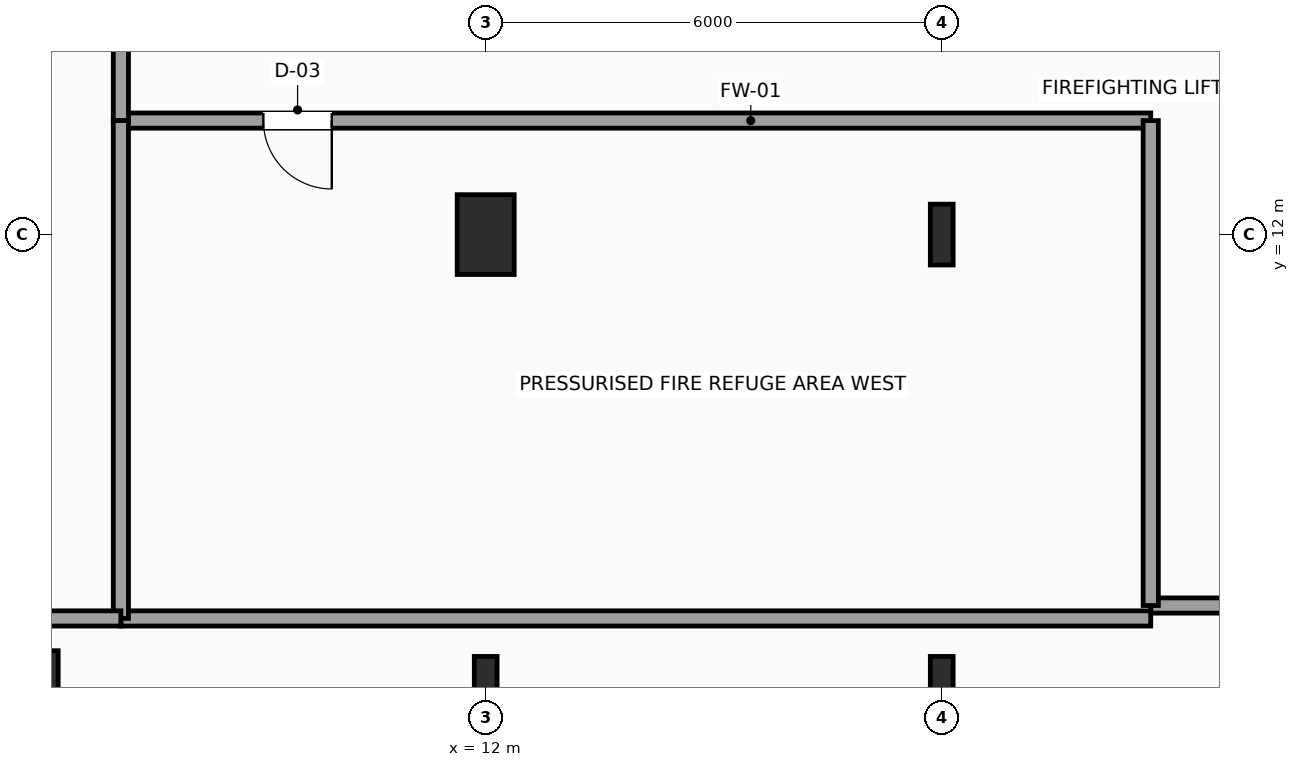
"""IFC4 building model, lengths in metres.
Left out: names, types, materials, properties, quantities, classifications, styles, units other than length and angle.
Written with IfcOpenShell. Run it as: python <this file> out.ifc"""

import sys

from ifc_helpers import new_model, si_unit, direction, frame, frame_2d, origin, origin_2d, place, context, subcontext, project, spatial, rectangle, i_section, extrude, element, fill, save


model = new_model("IFC4")
c1 = context("Model", 3, precision=1e-05, world=origin(), true_north=direction((0.0, 1.0)))
c2 = subcontext(c1, "Body", "Model", "MODEL_VIEW")
j1 = project(units=[si_unit("LENGTHUNIT", "METRE"), si_unit("PLANEANGLEUNIT", "RADIAN")], contexts=[c1])
p1 = place(None, origin())
s1 = spatial("IfcSite", under=j1, at=p1, CompositionType="ELEMENT")
p2 = place(p1, origin())
s2 = spatial("IfcBuilding", under=s1, at=p2, CompositionType="ELEMENT")
p3 = place(p2, frame((0.0, 0.0, 234.9)))
s3 = spatial("IfcBuildingStorey", under=s2, at=p3, CompositionType="ELEMENT", Elevation=234.9)
p4 = place(p3, frame((6.0, 6.0, 0.0), z_axis=(0.0, 0.0, 1.0), x_axis=(1.0, 0.0, 0.0)))
e1 = element("IfcColumn", 1, at=p4, inside=s3, PredefinedType="COLUMN", context=c2, shape_type="SweptSolid", body=[
    extrude(rectangle(XDim=0.75, YDim=1.05, at=origin_2d()), origin(), (0.0, 0.0, 1.0), 4.8),
])
p5 = place(p3, frame((12.0, 6.0, 0.0), z_axis=(0.0, 0.0, 1.0), x_axis=(1.0, 0.0, 0.0)))
e2 = element("IfcColumn", 2, at=p5, inside=s3, PredefinedType="COLUMN", context=c2, shape_type="SweptSolid", body=[
    extrude(i_section(OverallWidth=0.3, OverallDepth=0.9, WebThickness=0.019, FlangeThickness=0.035, FilletRadius=0.03, at=origin_2d()), origin(), (0.0, 0.0, 1.0), 4.8),
])
p6 = place(p3, frame((12.0, 12.0, 0.0), z_axis=(0.0, 0.0, 1.0), x_axis=(1.0, 0.0, 0.0)))
e3 = element("IfcColumn", 3, at=p6, inside=s3, PredefinedType="COLUMN", context=c2, shape_type="SweptSolid", body=[
    extrude(rectangle(XDim=0.75, YDim=1.05, at=origin_2d()), origin(), (0.0, 0.0, 1.0), 4.8),
])
p7 = place(p3, frame((18.0, 6.0, 0.0), z_axis=(0.0, 0.0, 1.0), x_axis=(1.0, 0.0, 0.0)))
e4 = element("IfcColumn", 4, at=p7, inside=s3, PredefinedType="COLUMN", context=c2, shape_type="SweptSolid", body=[
    extrude(i_section(OverallWidth=0.3, OverallDepth=0.9, WebThickness=0.019, FlangeThickness=0.035, FilletRadius=0.03, at=origin_2d()), origin(), (0.0, 0.0, 1.0), 4.8),
])
p8 = place(p3, frame((18.0, 12.0, 0.0), z_axis=(0.0, 0.0, 1.0), x_axis=(1.0, 0.0, 0.0)))
e5 = element("IfcColumn", 5, at=p8, inside=s3, PredefinedType="COLUMN", context=c2, shape_type="SweptSolid", body=[
    extrude(i_section(OverallWidth=0.3, OverallDepth=0.8, WebThickness=0.018, FlangeThickness=0.033, FilletRadius=0.03, at=origin_2d()), origin(), (0.0, 0.0, 1.0), 4.8),
])
p9 = place(p3, frame((20.75, 13.5, 0.0), z_axis=(0.0, 0.0, 1.0), x_axis=(-1.0, 0.0, 0.0)))
e6 = element("IfcWall", 6, at=p9, inside=s3, PredefinedType="SOLIDWALL", context=c2, shape_type="SweptSolid", body=[
    extrude(rectangle(XDim=13.55, YDim=0.2, at=frame_2d((6.775, 0.0))), origin(), (0.0, 0.0, 1.0), 4.6),
])
p10 = place(p9, frame((10.775, 0.0, 0.0)))
e7 = element("IfcOpeningElement", 7, at=p10, cuts=e6, PredefinedType="OPENING", context=c2, shape_type="SweptSolid", body=[
    extrude(rectangle(XDim=0.9, YDim=2.15, at=frame_2d((0.45, 1.075))), frame((0.0, 0.11, 0.0), z_axis=(0.0, -1.0, 0.0), x_axis=(1.0, 0.0, 0.0)), (0.0, 0.0, 1.0), 0.22),
])
p11 = place(p3, frame((7.2, 13.5, 0.0), z_axis=(0.0, 0.0, 1.0), x_axis=(0.0, 1.0, 0.0)))
e8 = element("IfcWall", 8, at=p11, inside=s3, PredefinedType="SOLIDWALL", context=c2, shape_type="SweptSolid", body=[
    extrude(rectangle(XDim=2.95, YDim=0.2, at=frame_2d((1.475, 0.0))), origin(), (0.0, 0.0, 1.0), 4.6),
])
p12 = place(p11, frame((0.975, 0.0, 0.0)))
e9 = element("IfcOpeningElement", 9, at=p12, cuts=e8, PredefinedType="OPENING", context=c2, shape_type="SweptSolid", body=[
    extrude(rectangle(XDim=0.9, YDim=2.15, at=frame_2d((0.45, 1.075))), frame((0.0, 0.11, 0.0), z_axis=(0.0, -1.0, 0.0), x_axis=(1.0, 0.0, 0.0)), (0.0, 0.0, 1.0), 0.22),
])
p13 = place(p3, frame((23.98, 7.12, 0.0), z_axis=(0.0, 0.0, 1.0), x_axis=(-1.0, 0.0, 0.0)))
e10 = element("IfcWall", 10, at=p13, inside=s3, PredefinedType="SOLIDWALL", context=c2, shape_type="SweptSolid", body=[
    extrude(rectangle(XDim=3.23, YDim=0.2, at=frame_2d((1.615, 0.0))), origin(), (0.0, 0.0, 1.0), 4.6),
])
p14 = place(p3, frame((20.75, 7.12, 0.0), z_axis=(0.0, 0.0, 1.0), x_axis=(0.0, 1.0, 0.0)))
e11 = element("IfcWall", 11, at=p14, inside=s3, PredefinedType="SOLIDWALL", context=c2, shape_type="SweptSolid", body=[
    extrude(rectangle(XDim=6.38, YDim=0.2, at=frame_2d((3.19, 0.0))), origin(), (0.0, 0.0, 1.0), 4.6),
])
p15 = place(p3, frame((7.2, 6.95, 0.0), z_axis=(0.0, 0.0, 1.0), x_axis=(1.0, 0.0, 0.0)))
e12 = element("IfcWall", 12, at=p15, inside=s3, PredefinedType="SOLIDWALL", context=c2, shape_type="SweptSolid", body=[
    extrude(rectangle(XDim=13.55, YDim=0.2, at=frame_2d((6.775, 0.0))), origin(), (0.0, 0.0, 1.0), 4.6),
])
p16 = place(p3, frame((7.2, 6.95, 0.0), z_axis=(0.0, 0.0, 1.0), x_axis=(0.0, 1.0, 0.0)))
e13 = element("IfcWall", 13, at=p16, inside=s3, PredefinedType="SOLIDWALL", context=c2, shape_type="SweptSolid", body=[
    extrude(rectangle(XDim=6.55, YDim=0.2, at=frame_2d((3.275, 0.0))), origin(), (0.0, 0.0, 1.0), 4.6),
])
p17 = place(p3, frame((1.75, 6.95, 0.0), z_axis=(0.0, 0.0, 1.0), x_axis=(1.0, 0.0, 0.0)))
e14 = element("IfcWall", 14, at=p17, inside=s3, PredefinedType="SOLIDWALL", context=c2, shape_type="SweptSolid", body=[
    extrude(rectangle(XDim=5.45, YDim=0.2, at=frame_2d((2.725, 0.0))), origin(), (0.0, 0.0, 1.0), 4.6),
])
p18 = place(p10, origin())
e15 = element("IfcDoor", 15, at=p18, inside=s3, OperationType="SINGLE_SWING_LEFT", PredefinedType="DOOR", context=c2, shape_type="SweptSolid", body=[
    extrude(rectangle(XDim=0.9, YDim=2.15, at=frame_2d((0.45, 1.075))), frame((0.0, 0.025, 0.0), z_axis=(0.0, -1.0, 0.0), x_axis=(1.0, 0.0, 0.0)), (0.0, 0.0, 1.0), 0.05),
])
fill(e7, e15)
save(model, sys.argv[1])
